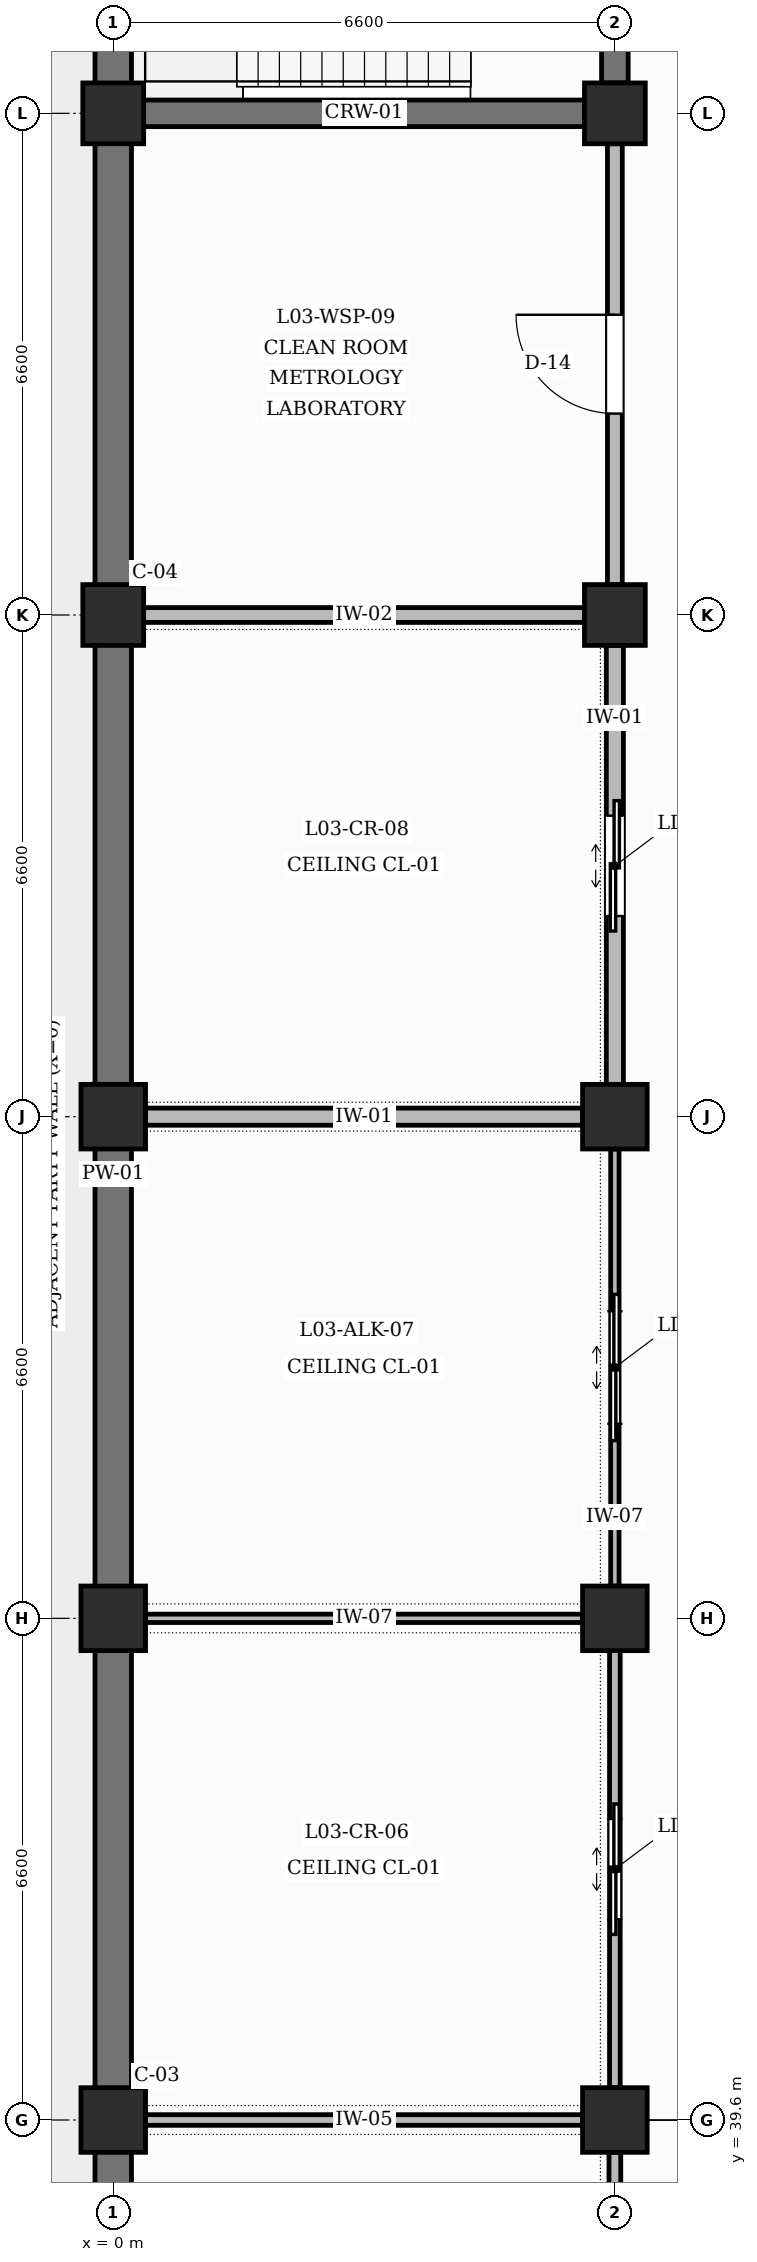
"""IFC4 building model, lengths in metres.
Left out: names, types, materials, properties, quantities, classifications, styles, units other than length and angle.
Written with IfcOpenShell. Run it as: python <this file> out.ifc"""

import sys

from ifc_helpers import new_model, si_unit, direction, frame, frame_2d, origin, origin_2d, place, context, subcontext, project, spatial, rectangle, extrude, element, fill, save


model = new_model("IFC4")
c1 = context("Model", 3, precision=1e-05, world=origin(), true_north=direction((0.0, 1.0)))
c2 = subcontext(c1, "Body", "Model", "MODEL_VIEW")
j1 = project(units=[si_unit("LENGTHUNIT", "METRE"), si_unit("PLANEANGLEUNIT", "RADIAN")], contexts=[c1])
p1 = place(None, origin())
s1 = spatial("IfcSite", under=j1, at=p1, CompositionType="ELEMENT")
p2 = place(p1, origin())
s2 = spatial("IfcBuilding", under=s1, at=p2, CompositionType="ELEMENT")
p3 = place(p2, frame((0.0, 0.0, 14.4)))
s3 = spatial("IfcBuildingStorey", under=s2, at=p3, CompositionType="ELEMENT", Elevation=14.4)
for number, where, z_axis, x_axis in (
    (1, (0.0, 39.6, 0.0), (0.0, 0.0, 1.0), (1.0, 0.0, 0.0)),
    (2, (0.0, 46.2, 0.0), (0.0, 0.0, 1.0), (1.0, 0.0, 0.0)),
    (3, (0.0, 52.8, 0.0), (0.0, 0.0, 1.0), (1.0, 0.0, 0.0)),
):
    element("IfcColumn", number, at=place(p3, frame(where, z_axis=z_axis, x_axis=x_axis)), inside=s3, PredefinedType="COLUMN", context=c2, shape_type="SweptSolid", body=[
        extrude(rectangle(XDim=0.85, YDim=0.85, at=origin_2d()), origin(), (0.0, 0.0, 1.0), 4.2),
    ])
for number, where, z_axis, x_axis in (
    (4, (0.0, 59.4, 0.0), (0.0, 0.0, 1.0), (1.0, 0.0, 0.0)),
    (5, (0.0, 66.0, 0.0), (0.0, 0.0, 1.0), (1.0, 0.0, 0.0)),
):
    element("IfcColumn", number, at=place(p3, frame(where, z_axis=z_axis, x_axis=x_axis)), inside=s3, PredefinedType="COLUMN", context=c2, shape_type="SweptSolid", body=[
        extrude(rectangle(XDim=0.8, YDim=0.8, at=origin_2d()), origin(), (0.0, 0.0, 1.0), 4.2),
    ])
for number, where, z_axis, x_axis in (
    (6, (6.6, 39.6, 0.0), (0.0, 0.0, 1.0), (1.0, 0.0, 0.0)),
    (7, (6.6, 46.2, 0.0), (0.0, 0.0, 1.0), (1.0, 0.0, 0.0)),
    (8, (6.6, 52.8, 0.0), (0.0, 0.0, 1.0), (1.0, 0.0, 0.0)),
):
    element("IfcColumn", number, at=place(p3, frame(where, z_axis=z_axis, x_axis=x_axis)), inside=s3, PredefinedType="COLUMN", context=c2, shape_type="SweptSolid", body=[
        extrude(rectangle(XDim=0.85, YDim=0.85, at=origin_2d()), origin(), (0.0, 0.0, 1.0), 4.2),
    ])
for number, where, z_axis, x_axis in (
    (9, (6.6, 59.4, 0.0), (0.0, 0.0, 1.0), (1.0, 0.0, 0.0)),
    (10, (6.6, 66.0, 0.0), (0.0, 0.0, 1.0), (1.0, 0.0, 0.0)),
):
    element("IfcColumn", number, at=place(p3, frame(where, z_axis=z_axis, x_axis=x_axis)), inside=s3, PredefinedType="COLUMN", context=c2, shape_type="SweptSolid", body=[
        extrude(rectangle(XDim=0.8, YDim=0.8, at=origin_2d()), origin(), (0.0, 0.0, 1.0), 4.2),
    ])
for number, where, z_axis, x_axis in (
    (11, (0.0, 33.425, 0.0), (0.0, 0.0, 1.0), (0.0, 1.0, 0.0)),
    (12, (0.0, 40.025, 0.0), (0.0, 0.0, 1.0), (0.0, 1.0, 0.0)),
    (13, (0.0, 46.625, 0.0), (0.0, 0.0, 1.0), (0.0, 1.0, 0.0)),
):
    element("IfcWall", number, at=place(p3, frame(where, z_axis=z_axis, x_axis=x_axis)), inside=s3, PredefinedType="SOLIDWALL", context=c2, shape_type="SweptSolid", body=[
        extrude(rectangle(XDim=5.75, YDim=0.48, at=frame_2d((2.875, 0.0))), origin(), (0.0, 0.0, 1.0), 3.26),
    ])
p4 = place(p3, frame((0.0, 53.225, 0.0), z_axis=(0.0, 0.0, 1.0), x_axis=(0.0, 1.0, 0.0)))
e14 = element("IfcWall", 14, at=p4, inside=s3, PredefinedType="SOLIDWALL", context=c2, shape_type="SweptSolid", body=[
    extrude(rectangle(XDim=5.775, YDim=0.48, at=frame_2d((2.887, 0.0))), origin(), (0.0, 0.0, 1.0), 3.26),
])
for number, where, z_axis, x_axis in (
    (15, (0.0, 59.8, 0.0), (0.0, 0.0, 1.0), (0.0, 1.0, 0.0)),
    (16, (0.0, 66.4, 0.0), (0.0, 0.0, 1.0), (0.0, 1.0, 0.0)),
):
    element("IfcWall", number, at=place(p3, frame(where, z_axis=z_axis, x_axis=x_axis)), inside=s3, PredefinedType="SOLIDWALL", context=c2, shape_type="SweptSolid", body=[
        extrude(rectangle(XDim=5.8, YDim=0.48, at=frame_2d((2.9, 0.0))), origin(), (0.0, 0.0, 1.0), 3.26),
    ])
p5 = place(p3, frame((0.4, 66.0, 0.0), z_axis=(0.0, 0.0, 1.0), x_axis=(1.0, 0.0, 0.0)))
e17 = element("IfcWall", 17, at=p5, inside=s3, PredefinedType="SHEAR", context=c2, shape_type="SweptSolid", body=[
    extrude(rectangle(XDim=5.8, YDim=0.35, at=frame_2d((2.9, 0.0))), origin(), (0.0, 0.0, 1.0), 3.16),
])
p6 = place(p3, frame((6.6, 66.4, 0.0), z_axis=(0.0, 0.0, 1.0), x_axis=(0.0, 1.0, 0.0)))
e18 = element("IfcWall", 18, at=p6, inside=s3, PredefinedType="SHEAR", context=c2, shape_type="SweptSolid", body=[
    extrude(rectangle(XDim=5.8, YDim=0.35, at=frame_2d((2.9, 0.0))), origin(), (0.0, 0.0, 1.0), 3.16),
])
p7 = place(p6, frame((2.35, 0.0, 0.0)))
e19 = element("IfcOpeningElement", 19, at=p7, cuts=e18, PredefinedType="OPENING", context=c2, shape_type="SweptSolid", body=[
    extrude(rectangle(XDim=1.1, YDim=2.15, at=frame_2d((0.55, 1.075))), frame((0.0, 0.185, 0.0), z_axis=(0.0, -1.0, 0.0), x_axis=(1.0, 0.0, 0.0)), (0.0, 0.0, 1.0), 0.37),
])
p8 = place(p3, frame((6.6, 33.425, 0.0), z_axis=(0.0, 0.0, 1.0), x_axis=(0.0, 1.0, 0.0)))
e20 = element("IfcWall", 20, at=p8, inside=s3, PredefinedType="PARTITIONING", context=c2, shape_type="SweptSolid", body=[
    extrude(rectangle(XDim=5.75, YDim=0.155, at=frame_2d((2.875, 0.0))), origin(), (0.0, 0.0, 1.0), 3.16),
])
p9 = place(p8, frame((2.135, 0.0, 0.0)))
e21 = element("IfcOpeningElement", 21, at=p9, cuts=e20, PredefinedType="OPENING", context=c2, shape_type="SweptSolid", body=[
    extrude(rectangle(XDim=1.48, YDim=2.25, at=frame_2d((0.74, 1.125))), frame((0.0, 0.087, 0.0), z_axis=(0.0, -1.0, 0.0), x_axis=(1.0, 0.0, 0.0)), (0.0, 0.0, 1.0), 0.175),
])
p10 = place(p3, frame((0.425, 39.6, 0.0), z_axis=(0.0, 0.0, 1.0), x_axis=(1.0, 0.0, 0.0)))
e22 = element("IfcWall", 22, at=p10, inside=s3, PredefinedType="PARTITIONING", context=c2, shape_type="SweptSolid", body=[
    extrude(rectangle(XDim=5.75, YDim=0.14, at=frame_2d((2.875, 0.0))), origin(), (0.0, 0.0, 1.0), 3.16),
])
p11 = place(p3, frame((6.6, 40.025, 0.0), z_axis=(0.0, 0.0, 1.0), x_axis=(0.0, 1.0, 0.0)))
e23 = element("IfcWall", 23, at=p11, inside=s3, PredefinedType="PARTITIONING", context=c2, shape_type="SweptSolid", body=[
    extrude(rectangle(XDim=5.75, YDim=0.14, at=frame_2d((2.875, 0.0))), origin(), (0.0, 0.0, 1.0), 3.16),
])
p12 = place(p11, frame((2.215, 0.0, 0.0)))
e24 = element("IfcOpeningElement", 24, at=p12, cuts=e23, PredefinedType="OPENING", context=c2, shape_type="SweptSolid", body=[
    extrude(rectangle(XDim=1.32, YDim=2.2, at=frame_2d((0.66, 1.1))), frame((0.0, 0.08, 0.0), z_axis=(0.0, -1.0, 0.0), x_axis=(1.0, 0.0, 0.0)), (0.0, 0.0, 1.0), 0.16),
])
p13 = place(p3, frame((0.425, 46.2, 0.0), z_axis=(0.0, 0.0, 1.0), x_axis=(1.0, 0.0, 0.0)))
e25 = element("IfcWall", 25, at=p13, inside=s3, PredefinedType="PARTITIONING", context=c2, shape_type="SweptSolid", body=[
    extrude(rectangle(XDim=5.75, YDim=0.11, at=frame_2d((2.875, 0.0))), origin(), (0.0, 0.0, 1.0), 3.16),
])
p14 = place(p3, frame((6.6, 46.625, 0.0), z_axis=(0.0, 0.0, 1.0), x_axis=(0.0, 1.0, 0.0)))
e26 = element("IfcWall", 26, at=p14, inside=s3, PredefinedType="PARTITIONING", context=c2, shape_type="SweptSolid", body=[
    extrude(rectangle(XDim=5.75, YDim=0.11, at=frame_2d((2.875, 0.0))), origin(), (0.0, 0.0, 1.0), 3.16),
])
p15 = place(p14, frame((2.135, 0.0, 0.0)))
e27 = element("IfcOpeningElement", 27, at=p15, cuts=e26, PredefinedType="OPENING", context=c2, shape_type="SweptSolid", body=[
    extrude(rectangle(XDim=1.48, YDim=2.25, at=frame_2d((0.74, 1.125))), frame((0.0, 0.065, 0.0), z_axis=(0.0, -1.0, 0.0), x_axis=(1.0, 0.0, 0.0)), (0.0, 0.0, 1.0), 0.13),
])
p16 = place(p3, frame((0.425, 52.8, 0.0), z_axis=(0.0, 0.0, 1.0), x_axis=(1.0, 0.0, 0.0)))
e28 = element("IfcWall", 28, at=p16, inside=s3, PredefinedType="PARTITIONING", context=c2, shape_type="SweptSolid", body=[
    extrude(rectangle(XDim=5.75, YDim=0.225, at=frame_2d((2.875, 0.0))), origin(), (0.0, 0.0, 1.0), 3.16),
])
p17 = place(p3, frame((6.6, 53.225, 0.0), z_axis=(0.0, 0.0, 1.0), x_axis=(0.0, 1.0, 0.0)))
e29 = element("IfcWall", 29, at=p17, inside=s3, PredefinedType="PARTITIONING", context=c2, shape_type="SweptSolid", body=[
    extrude(rectangle(XDim=5.775, YDim=0.225, at=frame_2d((2.887, 0.0))), origin(), (0.0, 0.0, 1.0), 3.16),
])
p18 = place(p17, frame((2.215, 0.0, 0.0)))
e30 = element("IfcOpeningElement", 30, at=p18, cuts=e29, PredefinedType="OPENING", context=c2, shape_type="SweptSolid", body=[
    extrude(rectangle(XDim=1.32, YDim=2.2, at=frame_2d((0.66, 1.1))), frame((0.0, 0.123, 0.0), z_axis=(0.0, -1.0, 0.0), x_axis=(1.0, 0.0, 0.0)), (0.0, 0.0, 1.0), 0.245),
])
p19 = place(p3, frame((0.4, 59.4, 0.0), z_axis=(0.0, 0.0, 1.0), x_axis=(1.0, 0.0, 0.0)))
e31 = element("IfcWall", 31, at=p19, inside=s3, PredefinedType="PARTITIONING", context=c2, shape_type="SweptSolid", body=[
    extrude(rectangle(XDim=5.8, YDim=0.195, at=frame_2d((2.9, 0.0))), origin(), (0.0, 0.0, 1.0), 3.16),
])
p20 = place(p3, frame((6.6, 59.8, 0.0), z_axis=(0.0, 0.0, 1.0), x_axis=(0.0, 1.0, 0.0)))
e32 = element("IfcWall", 32, at=p20, inside=s3, PredefinedType="PARTITIONING", context=c2, shape_type="SweptSolid", body=[
    extrude(rectangle(XDim=5.8, YDim=0.195, at=frame_2d((2.9, 0.0))), origin(), (0.0, 0.0, 1.0), 3.16),
])
p21 = place(p20, frame((2.25, 0.0, 0.0)))
e33 = element("IfcOpeningElement", 33, at=p21, cuts=e32, PredefinedType="OPENING", context=c2, shape_type="SweptSolid", body=[
    extrude(rectangle(XDim=1.3, YDim=2.3, at=frame_2d((0.65, 1.15))), frame((0.0, 0.107, 0.0), z_axis=(0.0, -1.0, 0.0), x_axis=(1.0, 0.0, 0.0)), (0.0, 0.0, 1.0), 0.215),
])
p22 = place(p12, origin())
e34 = element("IfcDoor", 34, at=p22, inside=s3, OperationType="DOUBLE_DOOR_SLIDING", PredefinedType="USERDEFINED", context=c2, shape_type="SweptSolid", body=[
    extrude(rectangle(XDim=1.32, YDim=2.2, at=frame_2d((0.66, 1.1))), frame((0.0, 0.025, 0.0), z_axis=(0.0, -1.0, 0.0), x_axis=(1.0, 0.0, 0.0)), (0.0, 0.0, 1.0), 0.05),
])
fill(e24, e34)
p23 = place(p15, origin())
e35 = element("IfcDoor", 35, at=p23, inside=s3, OperationType="DOUBLE_DOOR_SLIDING", PredefinedType="USERDEFINED", context=c2, shape_type="SweptSolid", body=[
    extrude(rectangle(XDim=1.48, YDim=2.25, at=frame_2d((0.74, 1.125))), frame((0.0, 0.025, 0.0), z_axis=(0.0, -1.0, 0.0), x_axis=(1.0, 0.0, 0.0)), (0.0, 0.0, 1.0), 0.05),
])
fill(e27, e35)
p24 = place(p18, origin())
e36 = element("IfcDoor", 36, at=p24, inside=s3, OperationType="DOUBLE_DOOR_SLIDING", PredefinedType="USERDEFINED", context=c2, shape_type="SweptSolid", body=[
    extrude(rectangle(XDim=1.32, YDim=2.2, at=frame_2d((0.66, 1.1))), frame((0.0, 0.025, 0.0), z_axis=(0.0, -1.0, 0.0), x_axis=(1.0, 0.0, 0.0)), (0.0, 0.0, 1.0), 0.05),
])
fill(e30, e36)
p25 = place(p21, origin())
e37 = element("IfcDoor", 37, at=p25, inside=s3, OperationType="SINGLE_SWING_RIGHT", PredefinedType="DOOR", context=c2, shape_type="SweptSolid", body=[
    extrude(rectangle(XDim=1.3, YDim=2.3, at=frame_2d((0.65, 1.15))), frame((0.0, 0.025, 0.0), z_axis=(0.0, -1.0, 0.0), x_axis=(1.0, 0.0, 0.0)), (0.0, 0.0, 1.0), 0.05),
])
fill(e33, e37)
save(model, sys.argv[1])
